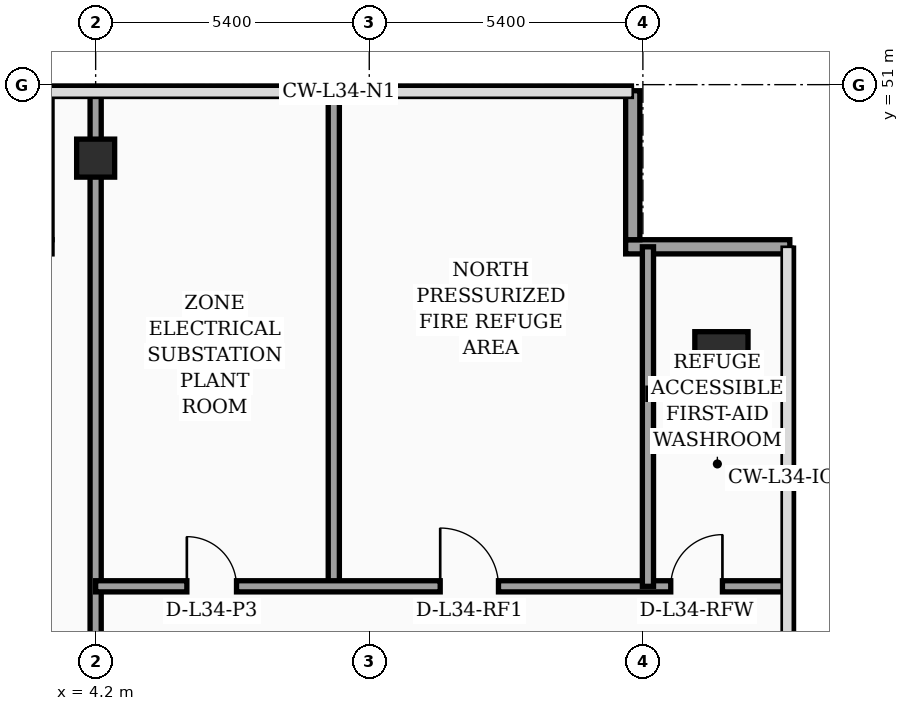
"""IFC4 building model, lengths in metres.
Left out: names, types, materials, properties, quantities, classifications, styles, units other than length and angle.
Written with IfcOpenShell. Run it as: python <this file> out.ifc"""

import sys

from ifc_helpers import new_model, si_unit, direction, frame, frame_2d, origin, origin_2d, place, context, subcontext, project, spatial, rectangle, hollow_rectangle, extrude, element, fill, save


model = new_model("IFC4")
c1 = context("Model", 3, precision=1e-05, world=origin(), true_north=direction((0.0, 1.0)))
c2 = subcontext(c1, "Body", "Model", "MODEL_VIEW")
j1 = project(units=[si_unit("LENGTHUNIT", "METRE"), si_unit("PLANEANGLEUNIT", "RADIAN")], contexts=[c1])
p1 = place(None, origin())
s1 = spatial("IfcSite", under=j1, at=p1, CompositionType="ELEMENT")
p2 = place(p1, origin())
s2 = spatial("IfcBuilding", under=s1, at=p2, CompositionType="ELEMENT")
p3 = place(p2, frame((0.0, 0.0, 139.2)))
s3 = spatial("IfcBuildingStorey", under=s2, at=p3, CompositionType="ELEMENT", Elevation=139.2)
p4 = place(p3, frame((4.2, 49.55, 0.0), z_axis=(0.0, 0.0, 1.0), x_axis=(1.0, 0.0, 0.0)))
e1 = element("IfcColumn", 1, at=p4, inside=s3, PredefinedType="COLUMN", context=c2, shape_type="SweptSolid", body=[
    extrude(hollow_rectangle(XDim=0.75, YDim=0.75, WallThickness=0.032, at=origin_2d()), origin(), (0.0, 0.0, 1.0), 4.56),
])
p5 = place(p3, frame((16.55, 45.6, 0.0), z_axis=(0.0, 0.0, 1.0), x_axis=(1.0, 0.0, 0.0)))
e2 = element("IfcColumn", 2, at=p5, inside=s3, PredefinedType="COLUMN", context=c2, shape_type="SweptSolid", body=[
    extrude(rectangle(XDim=1.05, YDim=1.05, at=origin_2d()), origin(), (0.0, 0.0, 1.0), 4.56),
])
p6 = place(p3, frame((17.9, 47.8, 0.0), z_axis=(0.0, 0.0, 1.0), x_axis=(-1.0, 0.0, 0.0)))
e3 = element("IfcWall", 3, at=p6, inside=s3, PredefinedType="SOLIDWALL", context=c2, shape_type="SweptSolid", body=[
    extrude(rectangle(XDim=3.24, YDim=0.28, at=frame_2d((1.62, 0.0))), origin(), (0.0, 0.0, 1.0), 4.56),
])
p7 = place(p3, frame((14.8, 47.94, 0.0), z_axis=(0.0, 0.0, 1.0), x_axis=(0.0, 1.0, 0.0)))
e4 = element("IfcWall", 4, at=p7, inside=s3, PredefinedType="SOLIDWALL", context=c2, shape_type="SweptSolid", body=[
    extrude(rectangle(XDim=2.94, YDim=0.28, at=frame_2d((1.47, 0.0))), origin(), (0.0, 0.0, 1.0), 4.56),
])
p8 = place(p3, frame((3.34, 47.8, 0.0), z_axis=(0.0, 0.0, 1.0), x_axis=(-1.0, 0.0, 0.0)))
e5 = element("IfcWall", 5, at=p8, inside=s3, PredefinedType="SOLIDWALL", context=c2, shape_type="SweptSolid", body=[
    extrude(rectangle(XDim=3.22, YDim=0.28, at=frame_2d((1.61, 0.0))), origin(), (0.0, 0.0, 1.0), 4.04),
])
p9 = place(p3, frame((4.2, 38.95, 0.0), z_axis=(0.0, 0.0, 1.0), x_axis=(0.0, 1.0, 0.0)))
e6 = element("IfcWall", 6, at=p9, inside=s3, PredefinedType="SOLIDWALL", context=c2, shape_type="SweptSolid", body=[
    extrude(rectangle(XDim=11.99, YDim=0.22, at=frame_2d((5.995, 0.0))), origin(), (0.0, 0.0, 1.0), 3.84),
])
p10 = place(p3, frame((8.9, 41.1, 0.0), z_axis=(0.0, 0.0, 1.0), x_axis=(0.0, 1.0, 0.0)))
e7 = element("IfcWall", 7, at=p10, inside=s3, PredefinedType="SOLIDWALL", context=c2, shape_type="SweptSolid", body=[
    extrude(rectangle(XDim=9.84, YDim=0.22, at=frame_2d((4.92, 0.0))), origin(), (0.0, 0.0, 1.0), 4.04),
])
p11 = place(p3, frame((4.2, 41.1, 0.0), z_axis=(0.0, 0.0, 1.0), x_axis=(1.0, 0.0, 0.0)))
e8 = element("IfcWall", 8, at=p11, inside=s3, PredefinedType="SOLIDWALL", context=c2, shape_type="SweptSolid", body=[
    extrude(rectangle(XDim=13.65, YDim=0.22, at=frame_2d((6.825, 0.0))), origin(), (0.0, 0.0, 1.0), 3.84),
])
p12 = place(p11, frame((1.8, 0.0, 0.0)))
e9 = element("IfcOpeningElement", 9, at=p12, cuts=e8, PredefinedType="OPENING", context=c2, shape_type="SweptSolid", body=[
    extrude(rectangle(XDim=0.98, YDim=2.15, at=frame_2d((0.49, 1.075))), frame((0.0, 0.12, 0.0), z_axis=(0.0, -1.0, 0.0), x_axis=(1.0, 0.0, 0.0)), (0.0, 0.0, 1.0), 0.24),
])
p13 = place(p11, frame((6.8, 0.0, 0.0)))
e10 = element("IfcOpeningElement", 10, at=p13, cuts=e8, PredefinedType="OPENING", context=c2, shape_type="SweptSolid", body=[
    extrude(rectangle(XDim=1.15, YDim=2.2, at=frame_2d((0.575, 1.1))), frame((0.0, 0.12, 0.0), z_axis=(0.0, -1.0, 0.0), x_axis=(1.0, 0.0, 0.0)), (0.0, 0.0, 1.0), 0.24),
])
p14 = place(p11, frame((11.35, 0.0, 0.0)))
e11 = element("IfcOpeningElement", 11, at=p14, cuts=e8, PredefinedType="OPENING", context=c2, shape_type="SweptSolid", body=[
    extrude(rectangle(XDim=1.02, YDim=2.2, at=frame_2d((0.51, 1.1))), frame((0.0, 0.12, 0.0), z_axis=(0.0, -1.0, 0.0), x_axis=(1.0, 0.0, 0.0)), (0.0, 0.0, 1.0), 0.24),
])
p15 = place(p3, frame((15.1, 41.1, 0.0), z_axis=(0.0, 0.0, 1.0), x_axis=(0.0, 1.0, 0.0)))
e12 = element("IfcWall", 12, at=p15, inside=s3, PredefinedType="SOLIDWALL", context=c2, shape_type="SweptSolid", body=[
    extrude(rectangle(XDim=6.7, YDim=0.22, at=frame_2d((3.35, 0.0))), origin(), (0.0, 0.0, 1.0), 3.84),
])
p16 = place(p3, frame((15.1, 44.9, 0.0), z_axis=(0.0, 0.0, 1.0), x_axis=(1.0, 0.0, 0.0)))
e13 = element("IfcWall", 13, at=p16, inside=s3, PredefinedType="SOLIDWALL", context=c2, shape_type="SweptSolid", body=[
    extrude(rectangle(XDim=2.75, YDim=0.22, at=frame_2d((1.375, 0.0))), origin(), (0.0, 0.0, 1.0), 3.84),
])
p17 = place(p12, origin())
e14 = element("IfcDoor", 14, at=p17, inside=s3, OperationType="SINGLE_SWING_LEFT", PredefinedType="DOOR", context=c2, shape_type="SweptSolid", body=[
    extrude(rectangle(XDim=0.98, YDim=2.15, at=frame_2d((0.49, 1.075))), frame((0.0, 0.025, 0.0), z_axis=(0.0, -1.0, 0.0), x_axis=(1.0, 0.0, 0.0)), (0.0, 0.0, 1.0), 0.05),
])
fill(e9, e14)
p18 = place(p13, origin())
e15 = element("IfcDoor", 15, at=p18, inside=s3, OperationType="SINGLE_SWING_LEFT", PredefinedType="DOOR", context=c2, shape_type="SweptSolid", body=[
    extrude(rectangle(XDim=1.15, YDim=2.2, at=frame_2d((0.575, 1.1))), frame((0.0, 0.025, 0.0), z_axis=(0.0, -1.0, 0.0), x_axis=(1.0, 0.0, 0.0)), (0.0, 0.0, 1.0), 0.05),
])
fill(e10, e15)
p19 = place(p14, origin())
e16 = element("IfcDoor", 16, at=p19, inside=s3, OperationType="SINGLE_SWING_RIGHT", PredefinedType="DOOR", context=c2, shape_type="SweptSolid", body=[
    extrude(rectangle(XDim=1.02, YDim=2.2, at=frame_2d((0.51, 1.1))), frame((0.0, 0.025, 0.0), z_axis=(0.0, -1.0, 0.0), x_axis=(1.0, 0.0, 0.0)), (0.0, 0.0, 1.0), 0.05),
])
fill(e11, e16)
save(model, sys.argv[1])
